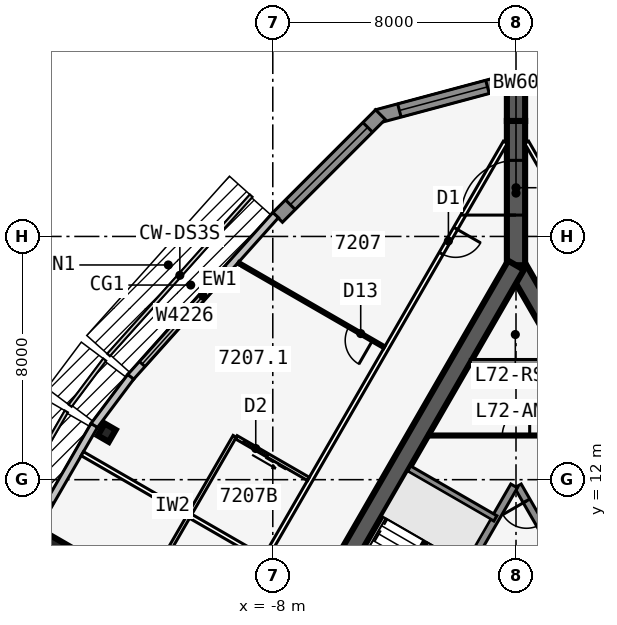
"""IFC4 building model, lengths in metres.
Left out: names, types, materials, properties, quantities, classifications, styles, units other than length and angle.
Written with IfcOpenShell. Run it as: python <this file> out.ifc"""

import sys

from ifc_helpers import new_model, si_unit, direction, frame, frame_2d, origin, origin_2d, place, context, subcontext, project, spatial, polyline, rectangle, i_section, outline, extrude, element, fill, save


model = new_model("IFC4")
c1 = context("Model", 3, precision=1e-05, world=origin(), true_north=direction((0.0, 1.0)))
c2 = subcontext(c1, "Body", "Model", "MODEL_VIEW")
j1 = project(units=[si_unit("LENGTHUNIT", "METRE"), si_unit("PLANEANGLEUNIT", "RADIAN")], contexts=[c1])
p1 = place(None, origin())
s1 = spatial("IfcSite", under=j1, at=p1, CompositionType="ELEMENT")
p2 = place(p1, origin())
s2 = spatial("IfcBuilding", under=s1, at=p2, CompositionType="ELEMENT")
p3 = place(p2, frame((0.0, 0.0, 271.7)))
s3 = spatial("IfcBuildingStorey", under=s2, at=p3, CompositionType="ELEMENT", Elevation=271.7)
p4 = place(p3, frame((16.5, -9.526, 0.0), z_axis=(0.0, 0.0, 1.0), x_axis=(-0.499999749417, 0.866025548458, 0.0)))
e1 = element("IfcWall", 1, at=p4, inside=s3, PredefinedType="SHEAR", context=c2, shape_type="SweptSolid", body=[
    extrude(rectangle(XDim=33.0, YDim=0.6, at=frame_2d((16.5, 0.0))), origin(), (0.0, 0.0, 1.0), 3.6),
])
p5 = place(p4, frame((14.15, 0.0, 0.0)))
e2 = element("IfcOpeningElement", 2, at=p5, cuts=e1, PredefinedType="OPENING", context=c2, shape_type="SweptSolid", body=[
    extrude(rectangle(XDim=1.8, YDim=2.13, at=frame_2d((0.9, 1.065))), frame((0.0, 0.31, 0.0), z_axis=(0.0, -1.0, 0.0), x_axis=(1.0, 0.0, 0.0)), (0.0, 0.0, 1.0), 0.62),
])
p6 = place(p4, frame((12.6, 0.0, 0.0)))
e3 = element("IfcOpeningElement", 3, at=p6, cuts=e1, PredefinedType="OPENING", context=c2, shape_type="SweptSolid", body=[
    extrude(rectangle(XDim=1.0, YDim=2.13, at=frame_2d((0.5, 1.065))), frame((0.0, 0.31, 0.0), z_axis=(0.0, -1.0, 0.0), x_axis=(1.0, 0.0, 0.0)), (0.0, 0.0, 1.0), 0.62),
])
p7 = place(p3, frame((5.379, 2.586, 0.0), z_axis=(0.0, 0.0, 1.0), x_axis=(-0.500001375892, 0.866024609411, 0.0)))
e4 = element("IfcWall", 4, at=p7, inside=s3, PredefinedType="SOLIDWALL", context=c2, shape_type="SweptSolid", body=[
    extrude(rectangle(XDim=10.633, YDim=0.25, at=frame_2d((5.316, 0.0))), origin(), (0.0, 0.0, 1.0), 3.35),
])
p8 = place(p7, frame((9.164, 0.0, 0.0)))
e5 = element("IfcOpeningElement", 5, at=p8, cuts=e4, PredefinedType="OPENING", context=c2, shape_type="SweptSolid", body=[
    extrude(rectangle(XDim=0.9, YDim=2.13, at=frame_2d((0.45, 1.065))), frame((0.0, 0.135, 0.0), z_axis=(0.0, -1.0, 0.0), x_axis=(1.0, 0.0, 0.0)), (0.0, 0.0, 1.0), 0.27),
])
p9 = place(p7, frame((1.0, 0.0, 0.0)))
e6 = element("IfcOpeningElement", 6, at=p9, cuts=e4, PredefinedType="OPENING", context=c2, shape_type="SweptSolid", body=[
    extrude(rectangle(XDim=1.1, YDim=2.13, at=frame_2d((0.55, 1.065))), frame((0.0, 0.135, 0.0), z_axis=(0.0, -1.0, 0.0), x_axis=(1.0, 0.0, 0.0)), (0.0, 0.0, 1.0), 0.27),
])
p10 = place(p7, frame((3.9, 0.0, 0.0)))
e7 = element("IfcOpeningElement", 7, at=p10, cuts=e4, PredefinedType="OPENING", context=c2, shape_type="SweptSolid", body=[
    extrude(rectangle(XDim=1.1, YDim=2.13, at=frame_2d((0.55, 1.065))), frame((0.0, 0.135, 0.0), z_axis=(0.0, -1.0, 0.0), x_axis=(1.0, 0.0, 0.0)), (0.0, 0.0, 1.0), 0.27),
])
p11 = place(p7, frame((6.8, 0.0, 0.0)))
e8 = element("IfcOpeningElement", 8, at=p11, cuts=e4, PredefinedType="OPENING", context=c2, shape_type="SweptSolid", body=[
    extrude(rectangle(XDim=1.1, YDim=2.13, at=frame_2d((0.55, 1.065))), frame((0.0, 0.135, 0.0), z_axis=(0.0, -1.0, 0.0), x_axis=(1.0, 0.0, 0.0)), (0.0, 0.0, 1.0), 0.27),
])
p12 = place(p3, frame((0.0, 19.052, 0.0), z_axis=(0.0, 0.0, 1.0), x_axis=(-0.499999749417, -0.866025548458, 0.0)))
e9 = element("IfcWall", 9, at=p12, inside=s3, PredefinedType="SHEAR", context=c2, shape_type="SweptSolid", body=[
    extrude(rectangle(XDim=33.0, YDim=0.6, at=frame_2d((16.5, 0.0))), origin(), (0.0, 0.0, 1.0), 3.6),
])
p13 = place(p12, frame((14.15, 0.0, 0.0)))
e10 = element("IfcOpeningElement", 10, at=p13, cuts=e9, PredefinedType="OPENING", context=c2, shape_type="SweptSolid", body=[
    extrude(rectangle(XDim=1.8, YDim=2.13, at=frame_2d((0.9, 1.065))), frame((0.0, 0.31, 0.0), z_axis=(0.0, -1.0, 0.0), x_axis=(1.0, 0.0, 0.0)), (0.0, 0.0, 1.0), 0.62),
])
p14 = place(p12, frame((12.6, 0.0, 0.0)))
e11 = element("IfcOpeningElement", 11, at=p14, cuts=e9, PredefinedType="OPENING", context=c2, shape_type="SweptSolid", body=[
    extrude(rectangle(XDim=1.0, YDim=2.13, at=frame_2d((0.5, 1.065))), frame((0.0, 0.31, 0.0), z_axis=(0.0, -1.0, 0.0), x_axis=(1.0, 0.0, 0.0)), (0.0, 0.0, 1.0), 0.62),
])
p15 = place(p3, frame((-0.062, 11.794, 0.0), z_axis=(0.0, 0.0, 1.0), x_axis=(-0.500006680225, -0.86602154692, 0.0)))
e12 = element("IfcWall", 12, at=p15, inside=s3, PredefinedType="SOLIDWALL", context=c2, shape_type="SweptSolid", body=[
    extrude(rectangle(XDim=7.733, YDim=0.25, at=frame_2d((3.866, 0.0))), origin(), (0.0, 0.0, 1.0), 3.35),
])
p16 = place(p3, frame((-0.679, 10.727, 0.0), z_axis=(0.0, 0.0, 1.0), x_axis=(-0.866027924134, 0.499995634601, 0.0)))
e13 = element("IfcWall", 13, at=p16, inside=s3, PredefinedType="SOLIDWALL", context=c2, shape_type="SweptSolid", body=[
    extrude(rectangle(XDim=3.275, YDim=0.2, at=frame_2d((1.637, 0.0))), origin(), (0.0, 0.0, 1.0), 3.35),
])
p17 = place(p3, frame((0.0, 19.052, 0.0), z_axis=(0.0, 0.0, 1.0), x_axis=(0.0, 1.0, 0.0)))
e14 = element("IfcWall", 14, at=p17, inside=s3, PredefinedType="SHEAR", context=c2, shape_type="SweptSolid", body=[
    extrude(rectangle(XDim=4.746, YDim=0.6, at=frame_2d((2.373, 0.0))), origin(), (0.0, 0.0, 1.0), 3.6),
])
p18 = place(p17, frame((1.65, 0.0, 0.0)))
e15 = element("IfcOpeningElement", 15, at=p18, cuts=e14, PredefinedType="OPENING", context=c2, shape_type="SweptSolid", body=[
    extrude(rectangle(XDim=1.8, YDim=2.13, at=frame_2d((0.9, 1.065))), frame((0.0, 0.31, 0.0), z_axis=(0.0, -1.0, 0.0), x_axis=(1.0, 0.0, 0.0)), (0.0, 0.0, 1.0), 0.62),
])
p19 = place(p3, frame((0.0, 23.799, 0.0), z_axis=(0.0, 0.0, 1.0), x_axis=(0.0, 1.0, 0.0)))
e16 = element("IfcWall", 16, at=p19, inside=s3, PredefinedType="SHEAR", context=c2, shape_type="SweptSolid", body=[
    extrude(rectangle(XDim=1.155, YDim=0.6, at=frame_2d((0.577, 0.0))), origin(), (0.0, 0.0, 1.0), 3.6),
])
p20 = place(p3, frame((-13.461, 13.545, 0.0), z_axis=(0.0, 0.0, 1.0), x_axis=(-0.866025403784, 0.5, 0.0)))
e17 = element("IfcColumn", 17, at=p20, inside=s3, PredefinedType="COLUMN", context=c2, shape_type="SweptSolid", body=[
    extrude(i_section(OverallWidth=0.419, OverallDepth=0.455, WebThickness=0.042, FlangeThickness=0.068, at=origin_2d()), origin(), (0.0, 0.0, 1.0), 3.6),
])
p21 = place(p3, frame((-15.312, 8.84, 0.0), z_axis=(0.0, 0.0, 1.0), x_axis=(-0.866025403784, 0.5, 0.0)))
e18 = element("IfcColumn", 18, at=p21, inside=s3, PredefinedType="COLUMN", context=c2, shape_type="SweptSolid", body=[
    extrude(rectangle(XDim=2.3, YDim=2.3, at=origin_2d()), origin(), (0.0, 0.0, 1.0), 3.6),
])
p22 = place(p3, frame((4.561, 23.948, 0.0), z_axis=(0.0, 0.0, 1.0), x_axis=(-0.965926628191, 0.258816052347, 0.0)))
e19 = element("IfcWall", 19, at=p22, inside=s3, PredefinedType="SOLIDWALL", context=c2, shape_type="SweptSolid", body=[
    extrude(outline(polyline([(4.781, 0.225), (4.722, 0.225), (4.375, 0.132), (4.351, 0.225), (0.0, 0.225), (0.0, -0.225), (4.781, -0.225), (4.781, 0.225)])), origin(), (0.0, 0.0, 1.0), 3.35),
])
p23 = place(p22, frame((0.75, 0.0, 0.45)))
e20 = element("IfcOpeningElement", 20, at=p23, cuts=e19, PredefinedType="OPENING", context=c2, shape_type="SweptSolid", body=[
    extrude(rectangle(XDim=3.0, YDim=2.6, at=frame_2d((1.5, 1.3))), frame((0.0, 0.235, 0.0), z_axis=(0.0, -1.0, 0.0), x_axis=(1.0, 0.0, 0.0)), (0.0, 0.0, 1.0), 0.47),
])
p24 = place(p3, frame((0.058, 25.186, 0.0), z_axis=(0.0, 0.0, 1.0), x_axis=(-0.965926628191, -0.258816052347, 0.0)))
e21 = element("IfcWall", 21, at=p24, inside=s3, PredefinedType="SOLIDWALL", context=c2, shape_type="SweptSolid", body=[
    extrude(outline(polyline([(4.781, 0.225), (0.431, 0.225), (0.406, 0.132), (0.059, 0.225), (0.0, 0.225), (0.0, -0.225), (4.781, -0.225), (4.781, 0.225)])), origin(), (0.0, 0.0, 1.0), 3.35),
])
p25 = place(p24, frame((1.031, 0.0, 0.45)))
e22 = element("IfcOpeningElement", 22, at=p25, cuts=e21, PredefinedType="OPENING", context=c2, shape_type="SweptSolid", body=[
    extrude(rectangle(XDim=3.0, YDim=2.6, at=frame_2d((1.5, 1.3))), frame((0.0, 0.235, 0.0), z_axis=(0.0, -1.0, 0.0), x_axis=(1.0, 0.0, 0.0)), (0.0, 0.0, 1.0), 0.47),
])
p26 = place(p3, frame((-4.46, 24.007, 0.0), z_axis=(0.0, 0.0, 1.0), x_axis=(-0.707106781187, -0.707106781187, 0.0)))
e23 = element("IfcWall", 23, at=p26, inside=s3, PredefinedType="SOLIDWALL", context=c2, shape_type="SweptSolid", body=[
    extrude(rectangle(XDim=4.781, YDim=0.45, at=frame_2d((2.391, 0.0))), origin(), (0.0, 0.0, 1.0), 3.35),
])
p27 = place(p26, frame((0.591, 0.0, 0.45)))
e24 = element("IfcOpeningElement", 24, at=p27, cuts=e23, PredefinedType="OPENING", context=c2, shape_type="SweptSolid", body=[
    extrude(rectangle(XDim=3.6, YDim=2.6, at=frame_2d((1.8, 1.3))), frame((0.0, 0.235, 0.0), z_axis=(0.0, -1.0, 0.0), x_axis=(1.0, 0.0, 0.0)), (0.0, 0.0, 1.0), 0.47),
])
p28 = place(p3, frame((-7.907, 20.701, 0.0), z_axis=(0.0, 0.0, 1.0), x_axis=(-0.667303550892, -0.744785855778, 0.0)))
e25 = element("IfcWall", 25, at=p28, inside=s3, PredefinedType="STANDARD", context=c2, shape_type="SweptSolid", body=[
    extrude(rectangle(XDim=7.153, YDim=0.25, at=frame_2d((3.576, 0.0))), origin(), (0.0, 0.0, 1.0), 3.35),
])
p29 = place(p28, frame((2.376, 0.0, 0.45)))
e26 = element("IfcOpeningElement", 26, at=p29, cuts=e25, PredefinedType="OPENING", context=c2, shape_type="SweptSolid", body=[
    extrude(rectangle(XDim=4.2, YDim=2.6, at=frame_2d((2.1, 1.3))), frame((0.0, 0.135, 0.0), z_axis=(0.0, -1.0, 0.0), x_axis=(1.0, 0.0, 0.0)), (0.0, 0.0, 1.0), 0.27),
])
p30 = place(p3, frame((-12.673, 15.382, 0.0), z_axis=(0.0, 0.0, 1.0), x_axis=(-0.599650843534, -0.800261748335, 0.0)))
e27 = element("IfcWall", 27, at=p30, inside=s3, PredefinedType="STANDARD", context=c2, shape_type="SweptSolid", body=[
    extrude(rectangle(XDim=2.014, YDim=0.25, at=frame_2d((1.007, 0.0))), origin(), (0.0, 0.0, 1.0), 3.35),
])
p31 = place(p3, frame((-13.873, 13.783, 0.0), z_axis=(0.0, 0.0, 1.0), x_axis=(-0.499993662806, -0.866029062534, 0.0)))
e28 = element("IfcWall", 28, at=p31, inside=s3, PredefinedType="STANDARD", context=c2, shape_type="SweptSolid", body=[
    extrude(rectangle(XDim=10.0, YDim=0.25, at=frame_2d((5.0, 0.0))), origin(), (0.0, 0.0, 1.0), 3.35),
])
p32 = place(p31, frame((2.9, 0.0, 0.45)))
e29 = element("IfcOpeningElement", 29, at=p32, cuts=e28, PredefinedType="OPENING", context=c2, shape_type="SweptSolid", body=[
    extrude(rectangle(XDim=4.2, YDim=2.6, at=frame_2d((2.1, 1.3))), frame((0.0, 0.135, 0.0), z_axis=(0.0, -1.0, 0.0), x_axis=(1.0, 0.0, 0.0)), (0.0, 0.0, 1.0), 0.27),
])
p33 = place(p3, frame((20.177, -11.245, 0.0), z_axis=(0.0, 0.0, 1.0), x_axis=(-0.499998875317, 0.866026053119, 0.0)))
e30 = element("IfcWall", 30, at=p33, inside=s3, PredefinedType="PARTITIONING", context=c2, shape_type="SweptSolid", body=[
    extrude(rectangle(XDim=39.654, YDim=0.15, at=frame_2d((19.827, 0.0))), origin(), (0.0, 0.0, 1.0), 3.35),
])
p34 = place(p33, frame((11.352, 0.0, 0.0)))
e31 = element("IfcOpeningElement", 31, at=p34, cuts=e30, PredefinedType="OPENING", context=c2, shape_type="SweptSolid", body=[
    extrude(rectangle(XDim=0.95, YDim=2.13, at=frame_2d((0.475, 1.065))), frame((0.0, 0.085, 0.0), z_axis=(0.0, -1.0, 0.0), x_axis=(1.0, 0.0, 0.0)), (0.0, 0.0, 1.0), 0.17),
])
p35 = place(p3, frame((-0.35, 23.096, 0.0), z_axis=(0.0, 0.0, 1.0), x_axis=(-0.499998875317, -0.866026053119, 0.0)))
e32 = element("IfcWall", 32, at=p35, inside=s3, PredefinedType="PARTITIONING", context=c2, shape_type="SweptSolid", body=[
    extrude(rectangle(XDim=39.654, YDim=0.15, at=frame_2d((19.827, 0.0))), origin(), (0.0, 0.0, 1.0), 3.35),
])
p36 = place(p35, frame((3.272, 0.0, 0.0)))
e33 = element("IfcOpeningElement", 33, at=p36, cuts=e32, PredefinedType="OPENING", context=c2, shape_type="SweptSolid", body=[
    extrude(rectangle(XDim=0.95, YDim=2.13, at=frame_2d((0.475, 1.065))), frame((0.0, 0.085, 0.0), z_axis=(0.0, -1.0, 0.0), x_axis=(1.0, 0.0, 0.0)), (0.0, 0.0, 1.0), 0.17),
])
p37 = place(p35, frame((19.052, 0.0, 0.0)))
e34 = element("IfcOpeningElement", 34, at=p37, cuts=e32, PredefinedType="OPENING", context=c2, shape_type="SweptSolid", body=[
    extrude(rectangle(XDim=0.95, YDim=2.13, at=frame_2d((0.475, 1.065))), frame((0.0, 0.085, 0.0), z_axis=(0.0, -1.0, 0.0), x_axis=(1.0, 0.0, 0.0)), (0.0, 0.0, 1.0), 0.17),
])
p38 = place(p35, frame((35.432, 0.0, 0.0)))
e35 = element("IfcOpeningElement", 35, at=p38, cuts=e32, PredefinedType="OPENING", context=c2, shape_type="SweptSolid", body=[
    extrude(rectangle(XDim=0.95, YDim=2.13, at=frame_2d((0.475, 1.065))), frame((0.0, 0.085, 0.0), z_axis=(0.0, -1.0, 0.0), x_axis=(1.0, 0.0, 0.0)), (0.0, 0.0, 1.0), 0.17),
])
p39 = place(p3, frame((-4.329, 16.355, 0.0), z_axis=(0.0, 0.0, 1.0), x_axis=(-0.866029066823, 0.499993655377, 0.0)))
e36 = element("IfcWall", 36, at=p39, inside=s3, PredefinedType="PARTITIONING", context=c2, shape_type="SweptSolid", body=[
    extrude(rectangle(XDim=5.559, YDim=0.1, at=frame_2d((2.779, 0.0))), origin(), (0.0, 0.0, 1.0), 2.301),
])
p40 = place(p39, frame((0.45, 0.0, 0.0)))
e37 = element("IfcOpeningElement", 37, at=p40, cuts=e36, PredefinedType="OPENING", context=c2, shape_type="SweptSolid", body=[
    extrude(rectangle(XDim=0.9, YDim=2.13, at=frame_2d((0.45, 1.065))), frame((0.0, 0.06, 0.0), z_axis=(0.0, -1.0, 0.0), x_axis=(1.0, 0.0, 0.0)), (0.0, 0.0, 1.0), 0.12),
])
p41 = place(p3, frame((-8.329, 9.427, 0.0), z_axis=(0.0, 0.0, 1.0), x_axis=(-0.866011785882, 0.500023586156, 0.0)))
e38 = element("IfcWall", 38, at=p41, inside=s3, PredefinedType="PARTITIONING", context=c2, shape_type="SweptSolid", body=[
    extrude(rectangle(XDim=6.854, YDim=0.15, at=frame_2d((3.427, 0.0))), origin(), (0.0, 0.0, 1.0), 3.35),
])
p42 = place(p3, frame((-9.253, 13.425, 0.0), z_axis=(0.0, 0.0, 1.0), x_axis=(-0.499990139034, -0.866031096941, 0.0)))
e39 = element("IfcWall", 39, at=p42, inside=s3, PredefinedType="PLUMBINGWALL", context=c2, shape_type="SweptSolid", body=[
    extrude(rectangle(XDim=3.0, YDim=0.12, at=frame_2d((1.5, 0.0))), origin(), (0.0, 0.0, 1.0), 3.35),
])
p43 = place(p3, frame((-6.829, 12.025, 0.0), z_axis=(0.0, 0.0, 1.0), x_axis=(-0.866035715982, 0.499982138324, 0.0)))
e40 = element("IfcWall", 40, at=p43, inside=s3, PredefinedType="PLUMBINGWALL", context=c2, shape_type="SweptSolid", body=[
    extrude(rectangle(XDim=2.74, YDim=0.12, at=frame_2d((1.37, 0.0))), origin(), (0.0, 0.0, 1.0), 2.309),
])
p44 = place(p43, frame((1.55, 0.0, 0.0)))
e41 = element("IfcOpeningElement", 41, at=p44, cuts=e40, PredefinedType="OPENING", context=c2, shape_type="SweptSolid", body=[
    extrude(rectangle(XDim=0.9, YDim=2.13, at=frame_2d((0.45, 1.065))), frame((0.0, 0.07, 0.0), z_axis=(0.0, -1.0, 0.0), x_axis=(1.0, 0.0, 0.0)), (0.0, 0.0, 1.0), 0.14),
])
p45 = place(p3, frame((-10.753, 10.827, 0.0), z_axis=(0.0, 0.0, 1.0), x_axis=(-0.50002537861, -0.866010750942, 0.0)))
e42 = element("IfcWall", 42, at=p45, inside=s3, PredefinedType="PLUMBINGWALL", context=c2, shape_type="SweptSolid", body=[
    extrude(rectangle(XDim=3.0, YDim=0.12, at=frame_2d((1.5, 0.0))), origin(), (0.0, 0.0, 1.0), 3.35),
])
p46 = place(p3, frame((-1.501, 15.853, 0.0), z_axis=(0.0, 0.0, 1.0), x_axis=(1.0, 0.0, 0.0)))
e43 = element("IfcWall", 43, at=p46, inside=s3, PredefinedType="SOLIDWALL", context=c2, shape_type="SweptSolid", body=[
    extrude(rectangle(XDim=3.002, YDim=0.2, at=frame_2d((1.501, 0.0))), origin(), (0.0, 0.0, 1.0), 3.35),
])
p47 = place(p3, frame((-2.887, 13.453, 0.0), z_axis=(0.0, 0.0, 1.0), x_axis=(1.0, 0.0, 0.0)))
e44 = element("IfcWall", 44, at=p47, inside=s3, PredefinedType="PARTITIONING", context=c2, shape_type="SweptSolid", body=[
    extrude(rectangle(XDim=5.773, YDim=0.1, at=frame_2d((2.887, 0.0))), origin(), (0.0, 0.0, 1.0), 3.35),
])
p48 = place(p47, frame((2.437, 0.0, 0.0)))
e45 = element("IfcOpeningElement", 45, at=p48, cuts=e44, PredefinedType="OPENING", context=c2, shape_type="SweptSolid", body=[
    extrude(rectangle(XDim=0.9, YDim=2.13, at=frame_2d((0.45, 1.065))), frame((0.0, 0.06, 0.0), z_axis=(0.0, -1.0, 0.0), x_axis=(1.0, 0.0, 0.0)), (0.0, 0.0, 1.0), 0.12),
])
p49 = place(p3, frame((-2.988, 9.978, 0.0), z_axis=(0.0, 0.0, 1.0), x_axis=(-0.499992232847, -0.866029888106, 0.0)))
e46 = element("IfcWall", 46, at=p49, inside=s3, PredefinedType="SOLIDWALL", context=c2, shape_type="SweptSolid", body=[
    extrude(rectangle(XDim=2.794, YDim=0.1, at=frame_2d((1.397, 0.0))), origin(), (0.0, 0.0, 1.0), 3.6),
])
p50 = place(p25, origin())
e47 = element("IfcWindow", 47, at=p50, inside=s3, PartitioningType="SINGLE_PANEL", PredefinedType="WINDOW", context=c2, shape_type="SweptSolid", body=[
    extrude(rectangle(XDim=3.0, YDim=2.6, at=frame_2d((1.5, 1.3))), frame((0.0, 0.03, 0.0), z_axis=(0.0, -1.0, 0.0), x_axis=(1.0, 0.0, 0.0)), (0.0, 0.0, 1.0), 0.06),
])
fill(e22, e47)
p51 = place(p27, origin())
e48 = element("IfcWindow", 48, at=p51, inside=s3, PartitioningType="SINGLE_PANEL", PredefinedType="WINDOW", context=c2, shape_type="SweptSolid", body=[
    extrude(rectangle(XDim=3.6, YDim=2.6, at=frame_2d((1.8, 1.3))), frame((0.0, 0.03, 0.0), z_axis=(0.0, -1.0, 0.0), x_axis=(1.0, 0.0, 0.0)), (0.0, 0.0, 1.0), 0.06),
])
fill(e24, e48)
p52 = place(p29, origin())
e49 = element("IfcWindow", 49, at=p52, inside=s3, PartitioningType="SINGLE_PANEL", PredefinedType="WINDOW", context=c2, shape_type="SweptSolid", body=[
    extrude(rectangle(XDim=4.2, YDim=2.6, at=frame_2d((2.1, 1.3))), frame((0.0, 0.03, 0.0), z_axis=(0.0, -1.0, 0.0), x_axis=(1.0, 0.0, 0.0)), (0.0, 0.0, 1.0), 0.06),
])
fill(e26, e49)
p53 = place(p40, origin())
e50 = element("IfcDoor", 50, at=p53, inside=s3, OperationType="SINGLE_SWING_LEFT", PredefinedType="DOOR", context=c2, shape_type="SweptSolid", body=[
    extrude(rectangle(XDim=0.9, YDim=2.13, at=frame_2d((0.45, 1.065))), frame((0.0, 0.025, 0.0), z_axis=(0.0, -1.0, 0.0), x_axis=(1.0, 0.0, 0.0)), (0.0, 0.0, 1.0), 0.05),
])
fill(e37, e50)
p54 = place(p36, origin())
e51 = element("IfcDoor", 51, at=p54, inside=s3, OperationType="SINGLE_SWING_LEFT", PredefinedType="DOOR", context=c2, shape_type="SweptSolid", body=[
    extrude(rectangle(XDim=0.95, YDim=2.13, at=frame_2d((0.475, 1.065))), frame((0.0, 0.025, 0.0), z_axis=(0.0, -1.0, 0.0), x_axis=(1.0, 0.0, 0.0)), (0.0, 0.0, 1.0), 0.05),
])
fill(e33, e51)
p55 = place(p44, origin())
e52 = element("IfcDoor", 52, at=p55, inside=s3, OperationType="SLIDING_TO_LEFT", PredefinedType="DOOR", context=c2, shape_type="SweptSolid", body=[
    extrude(rectangle(XDim=0.9, YDim=2.13, at=frame_2d((0.45, 1.065))), frame((0.0, 0.025, 0.0), z_axis=(0.0, -1.0, 0.0), x_axis=(1.0, 0.0, 0.0)), (0.0, 0.0, 1.0), 0.05),
])
fill(e41, e52)
p56 = place(p18, origin())
e53 = element("IfcDoor", 53, at=p56, inside=s3, OperationType="DOUBLE_DOOR_DOUBLE_SWING", PredefinedType="DOOR", context=c2, shape_type="SweptSolid", body=[
    extrude(rectangle(XDim=1.8, YDim=2.13, at=frame_2d((0.9, 1.065))), frame((0.0, 0.025, 0.0), z_axis=(0.0, -1.0, 0.0), x_axis=(1.0, 0.0, 0.0)), (0.0, 0.0, 1.0), 0.05),
])
fill(e15, e53)
p57 = place(p48, origin())
e54 = element("IfcDoor", 54, at=p57, inside=s3, OperationType="SINGLE_SWING_RIGHT", PredefinedType="DOOR", context=c2, shape_type="SweptSolid", body=[
    extrude(rectangle(XDim=0.9, YDim=2.13, at=frame_2d((0.45, 1.065))), frame((0.0, 0.025, 0.0), z_axis=(0.0, -1.0, 0.0), x_axis=(1.0, 0.0, 0.0)), (0.0, 0.0, 1.0), 0.05),
])
fill(e45, e54)
p58 = place(p8, origin())
e55 = element("IfcDoor", 55, at=p58, inside=s3, OperationType="SINGLE_SWING_RIGHT", PredefinedType="DOOR", context=c2, shape_type="SweptSolid", body=[
    extrude(rectangle(XDim=0.9, YDim=2.13, at=frame_2d((0.45, 1.065))), frame((0.0, 0.025, 0.0), z_axis=(0.0, -1.0, 0.0), x_axis=(1.0, 0.0, 0.0)), (0.0, 0.0, 1.0), 0.05),
])
fill(e5, e55)
save(model, sys.argv[1])
